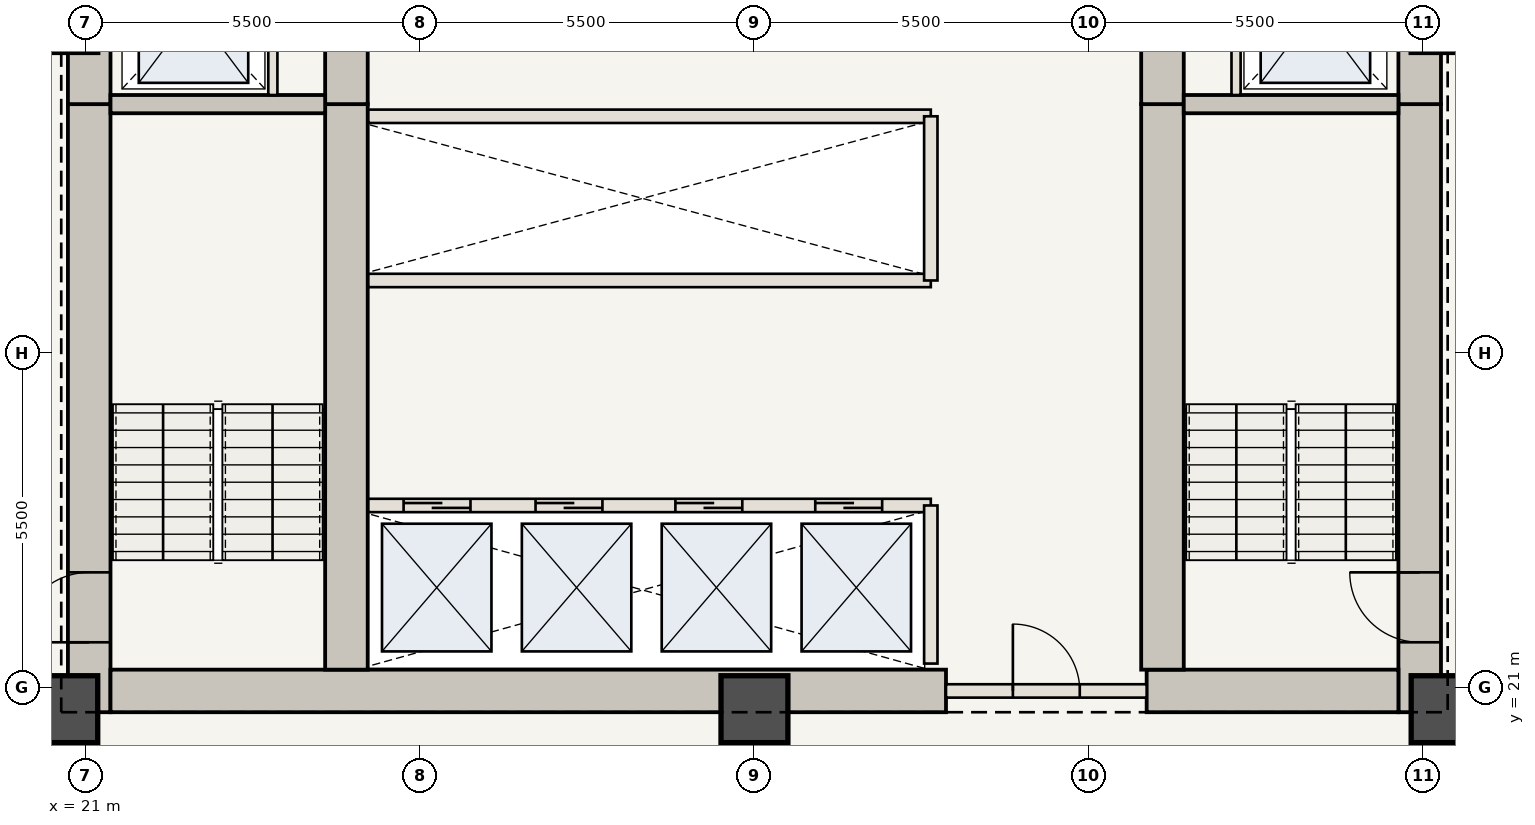
"""IFC4 building model, lengths in metres.
Left out: names, types, materials, properties, quantities, classifications, styles, units other than length and angle.
Written with IfcOpenShell. Run it as: python <this file> out.ifc"""

import sys

from ifc_helpers import new_model, si_unit, direction, frame, frame_2d, origin, origin_2d, place, context, subcontext, project, spatial, rectangle, extrude, element, fill, save


model = new_model("IFC4")
c1 = context("Model", 3, precision=1e-05, world=origin(), true_north=direction((0.0, 1.0)))
c2 = subcontext(c1, "Body", "Model", "MODEL_VIEW")
j1 = project(units=[si_unit("LENGTHUNIT", "METRE"), si_unit("PLANEANGLEUNIT", "RADIAN")], contexts=[c1])
p1 = place(None, origin())
s1 = spatial("IfcSite", under=j1, at=p1, CompositionType="ELEMENT")
p2 = place(p1, origin())
s2 = spatial("IfcBuilding", under=s1, at=p2, CompositionType="ELEMENT")
p3 = place(p2, frame((0.0, 0.0, 42.35)))
s3 = spatial("IfcBuildingStorey", under=s2, at=p3, CompositionType="ELEMENT", Elevation=42.35)
p4 = place(p3, frame((21.06, 20.6, 0.0), z_axis=(0.0, 0.0, 1.0), x_axis=(0.0, 1.0, 0.0)))
e1 = element("IfcWall", 1, at=p4, inside=s3, PredefinedType="SHEAR", context=c2, shape_type="SweptSolid", body=[
    extrude(rectangle(XDim=10.0, YDim=0.7, at=frame_2d((5.0, 0.0))), origin(), (0.0, 0.0, 1.0), 3.5),
])
p5 = place(p4, frame((1.15, 0.0, 0.0)))
e2 = element("IfcOpeningElement", 2, at=p5, cuts=e1, PredefinedType="OPENING", context=c2, shape_type="SweptSolid", body=[
    extrude(rectangle(XDim=1.15, YDim=2.15, at=frame_2d((0.575, 1.075))), frame((0.0, 0.36, 0.0), z_axis=(0.0, -1.0, 0.0), x_axis=(1.0, 0.0, 0.0)), (0.0, 0.0, 1.0), 0.72),
])
p6 = place(p3, frame((21.06, 30.6, 0.0), z_axis=(0.0, 0.0, 1.0), x_axis=(0.0, 1.0, 0.0)))
e3 = element("IfcWall", 3, at=p6, inside=s3, PredefinedType="SHEAR", context=c2, shape_type="SweptSolid", body=[
    extrude(rectangle(XDim=12.75, YDim=0.7, at=frame_2d((6.375, 0.0))), origin(), (0.0, 0.0, 1.0), 3.5),
])
p7 = place(p6, frame((4.2, 0.0, 0.0)))
e4 = element("IfcOpeningElement", 4, at=p7, cuts=e3, PredefinedType="OPENING", context=c2, shape_type="SweptSolid", body=[
    extrude(rectangle(XDim=1.1, YDim=2.15, at=frame_2d((0.55, 1.075))), frame((0.0, 0.36, 0.0), z_axis=(0.0, -1.0, 0.0), x_axis=(1.0, 0.0, 0.0)), (0.0, 0.0, 1.0), 0.72),
])
p8 = place(p6, frame((8.05, 0.0, 0.0)))
e5 = element("IfcOpeningElement", 5, at=p8, cuts=e3, PredefinedType="OPENING", context=c2, shape_type="SweptSolid", body=[
    extrude(rectangle(XDim=0.92, YDim=2.1, at=frame_2d((0.46, 1.05))), frame((0.0, 0.36, 0.0), z_axis=(0.0, -1.0, 0.0), x_axis=(1.0, 0.0, 0.0)), (0.0, 0.0, 1.0), 0.72),
])
p9 = place(p6, frame((9.45, 0.0, 0.0)))
e6 = element("IfcOpeningElement", 6, at=p9, cuts=e3, PredefinedType="OPENING", context=c2, shape_type="SweptSolid", body=[
    extrude(rectangle(XDim=0.88, YDim=2.1, at=frame_2d((0.44, 1.05))), frame((0.0, 0.36, 0.0), z_axis=(0.0, -1.0, 0.0), x_axis=(1.0, 0.0, 0.0)), (0.0, 0.0, 1.0), 0.72),
])
p10 = place(p6, frame((10.85, 0.0, 0.0)))
e7 = element("IfcOpeningElement", 7, at=p10, cuts=e3, PredefinedType="OPENING", context=c2, shape_type="SweptSolid", body=[
    extrude(rectangle(XDim=0.88, YDim=2.1, at=frame_2d((0.44, 1.05))), frame((0.0, 0.36, 0.0), z_axis=(0.0, -1.0, 0.0), x_axis=(1.0, 0.0, 0.0)), (0.0, 0.0, 1.0), 0.72),
])
p11 = place(p3, frame((42.94, 20.6, 0.0), z_axis=(0.0, 0.0, 1.0), x_axis=(0.0, 1.0, 0.0)))
e8 = element("IfcWall", 8, at=p11, inside=s3, PredefinedType="SHEAR", context=c2, shape_type="SweptSolid", body=[
    extrude(rectangle(XDim=10.0, YDim=0.7, at=frame_2d((5.0, 0.0))), origin(), (0.0, 0.0, 1.0), 3.5),
])
p12 = place(p11, frame((1.15, 0.0, 0.0)))
e9 = element("IfcOpeningElement", 9, at=p12, cuts=e8, PredefinedType="OPENING", context=c2, shape_type="SweptSolid", body=[
    extrude(rectangle(XDim=1.15, YDim=2.15, at=frame_2d((0.575, 1.075))), frame((0.0, 0.36, 0.0), z_axis=(0.0, -1.0, 0.0), x_axis=(1.0, 0.0, 0.0)), (0.0, 0.0, 1.0), 0.72),
])
p13 = place(p3, frame((42.94, 30.6, 0.0), z_axis=(0.0, 0.0, 1.0), x_axis=(0.0, 1.0, 0.0)))
e10 = element("IfcWall", 10, at=p13, inside=s3, PredefinedType="SHEAR", context=c2, shape_type="SweptSolid", body=[
    extrude(rectangle(XDim=12.75, YDim=0.7, at=frame_2d((6.375, 0.0))), origin(), (0.0, 0.0, 1.0), 3.5),
])
p14 = place(p13, frame((4.2, 0.0, 0.0)))
e11 = element("IfcOpeningElement", 11, at=p14, cuts=e10, PredefinedType="OPENING", context=c2, shape_type="SweptSolid", body=[
    extrude(rectangle(XDim=1.1, YDim=2.15, at=frame_2d((0.55, 1.075))), frame((0.0, 0.36, 0.0), z_axis=(0.0, -1.0, 0.0), x_axis=(1.0, 0.0, 0.0)), (0.0, 0.0, 1.0), 0.72),
])
p15 = place(p13, frame((9.2, 0.0, 0.0)))
e12 = element("IfcOpeningElement", 12, at=p15, cuts=e10, PredefinedType="OPENING", context=c2, shape_type="SweptSolid", body=[
    extrude(rectangle(XDim=0.92, YDim=2.1, at=frame_2d((0.46, 1.05))), frame((0.0, 0.36, 0.0), z_axis=(0.0, -1.0, 0.0), x_axis=(1.0, 0.0, 0.0)), (0.0, 0.0, 1.0), 0.72),
])
p16 = place(p3, frame((21.41, 20.95, 0.0), z_axis=(0.0, 0.0, 1.0), x_axis=(1.0, 0.0, 0.0)))
e13 = element("IfcWall", 13, at=p16, inside=s3, PredefinedType="SHEAR", context=c2, shape_type="SweptSolid", body=[
    extrude(rectangle(XDim=13.74, YDim=0.7, at=frame_2d((6.87, 0.0))), origin(), (0.0, 0.0, 1.0), 3.5),
])
p17 = place(p3, frame((38.45, 20.95, 0.0), z_axis=(0.0, 0.0, 1.0), x_axis=(1.0, 0.0, 0.0)))
e14 = element("IfcWall", 14, at=p17, inside=s3, PredefinedType="SHEAR", context=c2, shape_type="SweptSolid", body=[
    extrude(rectangle(XDim=4.14, YDim=0.7, at=frame_2d((2.07, 0.0))), origin(), (0.0, 0.0, 1.0), 3.5),
])
p18 = place(p3, frame((25.29, 21.3, 0.0), z_axis=(0.0, 0.0, 1.0), x_axis=(0.0, 1.0, 0.0)))
e15 = element("IfcWall", 15, at=p18, inside=s3, PredefinedType="SHEAR", context=c2, shape_type="SweptSolid", body=[
    extrude(rectangle(XDim=9.3, YDim=0.7, at=frame_2d((4.65, 0.0))), origin(), (0.0, 0.0, 1.0), 3.5),
])
p19 = place(p3, frame((25.29, 30.6, 0.0), z_axis=(0.0, 0.0, 1.0), x_axis=(0.0, 1.0, 0.0)))
e16 = element("IfcWall", 16, at=p19, inside=s3, PredefinedType="SHEAR", context=c2, shape_type="SweptSolid", body=[
    extrude(rectangle(XDim=12.05, YDim=0.7, at=frame_2d((6.025, 0.0))), origin(), (0.0, 0.0, 1.0), 3.5),
])
p20 = place(p19, frame((6.25, 0.0, 0.0)))
e17 = element("IfcOpeningElement", 17, at=p20, cuts=e16, PredefinedType="OPENING", context=c2, shape_type="SweptSolid", body=[
    extrude(rectangle(XDim=1.1, YDim=2.15, at=frame_2d((0.55, 1.075))), frame((0.0, 0.36, 0.0), z_axis=(0.0, -1.0, 0.0), x_axis=(1.0, 0.0, 0.0)), (0.0, 0.0, 1.0), 0.72),
])
p21 = place(p3, frame((38.71, 21.3, 0.0), z_axis=(0.0, 0.0, 1.0), x_axis=(0.0, 1.0, 0.0)))
e18 = element("IfcWall", 18, at=p21, inside=s3, PredefinedType="SHEAR", context=c2, shape_type="SweptSolid", body=[
    extrude(rectangle(XDim=9.3, YDim=0.7, at=frame_2d((4.65, 0.0))), origin(), (0.0, 0.0, 1.0), 3.5),
])
p22 = place(p3, frame((38.71, 30.6, 0.0), z_axis=(0.0, 0.0, 1.0), x_axis=(0.0, 1.0, 0.0)))
e19 = element("IfcWall", 19, at=p22, inside=s3, PredefinedType="SHEAR", context=c2, shape_type="SweptSolid", body=[
    extrude(rectangle(XDim=12.05, YDim=0.7, at=frame_2d((6.025, 0.0))), origin(), (0.0, 0.0, 1.0), 3.5),
])
for number, where, z_axis, x_axis in (
    (20, (20.65, 20.65, 0.0), (0.0, 0.0, 1.0), (1.0, 0.0, 0.0)),
    (21, (32.0, 20.65, 0.0), (0.0, 0.0, 1.0), (1.0, 0.0, 0.0)),
    (22, (43.35, 20.65, 0.0), (0.0, 0.0, 1.0), (1.0, 0.0, 0.0)),
):
    element("IfcColumn", number, at=place(p3, frame(where, z_axis=z_axis, x_axis=x_axis)), inside=s3, PredefinedType="COLUMN", context=c2, shape_type="SweptSolid", body=[
        extrude(rectangle(XDim=1.1, YDim=1.1, at=origin_2d()), origin(), (0.0, 0.0, 1.0), 3.5),
    ])
for number, where, z_axis, x_axis in (
    (23, (21.41, 30.6, 0.0), (0.0, 0.0, 1.0), (1.0, 0.0, 0.0)),
    (24, (39.06, 30.6, 0.0), (0.0, 0.0, 1.0), (1.0, 0.0, 0.0)),
):
    element("IfcWall", number, at=place(p3, frame(where, z_axis=z_axis, x_axis=x_axis)), inside=s3, PredefinedType="SHEAR", context=c2, shape_type="SweptSolid", body=[
        extrude(rectangle(XDim=3.53, YDim=0.3, at=frame_2d((1.765, 0.0))), origin(), (0.0, 0.0, 1.0), 3.32),
    ])
for number, where, z_axis, x_axis in (
    (25, (24.08, 30.75, 0.0), (0.0, 0.0, 1.0), (0.0, 1.0, 0.0)),
    (26, (39.92, 30.75, 0.0), (0.0, 0.0, 1.0), (0.0, 1.0, 0.0)),
):
    element("IfcWall", number, at=place(p3, frame(where, z_axis=z_axis, x_axis=x_axis)), inside=s3, PredefinedType="STANDARD", context=c2, shape_type="SweptSolid", body=[
        extrude(rectangle(XDim=2.65, YDim=0.15, at=frame_2d((1.325, 0.0))), origin(), (0.0, 0.0, 1.0), 3.32),
    ])
p23 = place(p3, frame((35.15, 20.95, 0.0), z_axis=(0.0, 0.0, 1.0), x_axis=(1.0, 0.0, 0.0)))
e27 = element("IfcWall", 27, at=p23, inside=s3, PredefinedType="STANDARD", context=c2, shape_type="SweptSolid", body=[
    extrude(rectangle(XDim=3.3, YDim=0.22, at=frame_2d((1.65, 0.0))), origin(), (0.0, 0.0, 1.0), 3.32),
])
p24 = place(p23, frame((1.1, 0.0, 0.0)))
e28 = element("IfcOpeningElement", 28, at=p24, cuts=e27, PredefinedType="OPENING", context=c2, shape_type="SweptSolid", body=[
    extrude(rectangle(XDim=1.1, YDim=2.15, at=frame_2d((0.55, 1.075))), frame((0.0, 0.12, 0.0), z_axis=(0.0, -1.0, 0.0), x_axis=(1.0, 0.0, 0.0)), (0.0, 0.0, 1.0), 0.24),
])
p25 = place(p3, frame((25.65, 24.0, 0.0), z_axis=(0.0, 0.0, 1.0), x_axis=(1.0, 0.0, 0.0)))
e29 = element("IfcWall", 29, at=p25, inside=s3, PredefinedType="STANDARD", context=c2, shape_type="SweptSolid", body=[
    extrude(rectangle(XDim=9.25, YDim=0.22, at=frame_2d((4.625, 0.0))), origin(), (0.0, 0.0, 1.0), 3.32),
])
p26 = place(p25, frame((0.58, 0.0, 0.0)))
e30 = element("IfcOpeningElement", 30, at=p26, cuts=e29, PredefinedType="OPENING", context=c2, shape_type="SweptSolid", body=[
    extrude(rectangle(XDim=1.1, YDim=2.15, at=frame_2d((0.55, 1.075))), frame((0.0, 0.12, 0.0), z_axis=(0.0, -1.0, 0.0), x_axis=(1.0, 0.0, 0.0)), (0.0, 0.0, 1.0), 0.24),
])
p27 = place(p25, frame((2.75, 0.0, 0.0)))
e31 = element("IfcOpeningElement", 31, at=p27, cuts=e29, PredefinedType="OPENING", context=c2, shape_type="SweptSolid", body=[
    extrude(rectangle(XDim=1.1, YDim=2.15, at=frame_2d((0.55, 1.075))), frame((0.0, 0.12, 0.0), z_axis=(0.0, -1.0, 0.0), x_axis=(1.0, 0.0, 0.0)), (0.0, 0.0, 1.0), 0.24),
])
p28 = place(p25, frame((5.05, 0.0, 0.0)))
e32 = element("IfcOpeningElement", 32, at=p28, cuts=e29, PredefinedType="OPENING", context=c2, shape_type="SweptSolid", body=[
    extrude(rectangle(XDim=1.1, YDim=2.15, at=frame_2d((0.55, 1.075))), frame((0.0, 0.12, 0.0), z_axis=(0.0, -1.0, 0.0), x_axis=(1.0, 0.0, 0.0)), (0.0, 0.0, 1.0), 0.24),
])
p29 = place(p25, frame((7.35, 0.0, 0.0)))
e33 = element("IfcOpeningElement", 33, at=p29, cuts=e29, PredefinedType="OPENING", context=c2, shape_type="SweptSolid", body=[
    extrude(rectangle(XDim=1.1, YDim=2.15, at=frame_2d((0.55, 1.075))), frame((0.0, 0.12, 0.0), z_axis=(0.0, -1.0, 0.0), x_axis=(1.0, 0.0, 0.0)), (0.0, 0.0, 1.0), 0.24),
])
p30 = place(p3, frame((34.9, 21.4, 0.0), z_axis=(0.0, 0.0, 1.0), x_axis=(0.0, 1.0, 0.0)))
e34 = element("IfcWall", 34, at=p30, inside=s3, PredefinedType="STANDARD", context=c2, shape_type="SweptSolid", body=[
    extrude(rectangle(XDim=2.6, YDim=0.22, at=frame_2d((1.3, 0.0))), origin(), (0.0, 0.0, 1.0), 3.32),
])
for number, where, z_axis, x_axis in (
    (35, (25.65, 27.7, 0.0), (0.0, 0.0, 1.0), (1.0, 0.0, 0.0)),
    (36, (25.65, 30.4, 0.0), (0.0, 0.0, 1.0), (1.0, 0.0, 0.0)),
):
    element("IfcWall", number, at=place(p3, frame(where, z_axis=z_axis, x_axis=x_axis)), inside=s3, PredefinedType="STANDARD", context=c2, shape_type="SweptSolid", body=[
        extrude(rectangle(XDim=9.25, YDim=0.22, at=frame_2d((4.625, 0.0))), origin(), (0.0, 0.0, 1.0), 3.32),
    ])
p31 = place(p3, frame((34.9, 27.7, 0.0), z_axis=(0.0, 0.0, 1.0), x_axis=(0.0, 1.0, 0.0)))
e37 = element("IfcWall", 37, at=p31, inside=s3, PredefinedType="STANDARD", context=c2, shape_type="SweptSolid", body=[
    extrude(rectangle(XDim=2.7, YDim=0.22, at=frame_2d((1.35, 0.0))), origin(), (0.0, 0.0, 1.0), 3.32),
])
p32 = place(p5, origin())
e38 = element("IfcDoor", 38, at=p32, inside=s3, OperationType="SINGLE_SWING_LEFT", PredefinedType="DOOR", context=c2, shape_type="SweptSolid", body=[
    extrude(rectangle(XDim=1.15, YDim=2.15, at=frame_2d((0.575, 1.075))), frame((0.0, 0.025, 0.0), z_axis=(0.0, -1.0, 0.0), x_axis=(1.0, 0.0, 0.0)), (0.0, 0.0, 1.0), 0.05),
])
fill(e2, e38)
p33 = place(p12, origin())
e39 = element("IfcDoor", 39, at=p33, inside=s3, OperationType="SINGLE_SWING_RIGHT", PredefinedType="DOOR", context=c2, shape_type="SweptSolid", body=[
    extrude(rectangle(XDim=1.15, YDim=2.15, at=frame_2d((0.575, 1.075))), frame((0.0, 0.025, 0.0), z_axis=(0.0, -1.0, 0.0), x_axis=(1.0, 0.0, 0.0)), (0.0, 0.0, 1.0), 0.05),
])
fill(e9, e39)
p34 = place(p24, origin())
e40 = element("IfcDoor", 40, at=p34, inside=s3, OperationType="SINGLE_SWING_LEFT", PredefinedType="DOOR", context=c2, shape_type="SweptSolid", body=[
    extrude(rectangle(XDim=1.1, YDim=2.15, at=frame_2d((0.55, 1.075))), frame((0.0, 0.025, 0.0), z_axis=(0.0, -1.0, 0.0), x_axis=(1.0, 0.0, 0.0)), (0.0, 0.0, 1.0), 0.05),
])
fill(e28, e40)
p35 = place(p26, origin())
e41 = element("IfcDoor", 41, at=p35, inside=s3, OperationType="DOUBLE_DOOR_SLIDING", PredefinedType="DOOR", context=c2, shape_type="SweptSolid", body=[
    extrude(rectangle(XDim=1.1, YDim=2.15, at=frame_2d((0.55, 1.075))), frame((0.0, 0.025, 0.0), z_axis=(0.0, -1.0, 0.0), x_axis=(1.0, 0.0, 0.0)), (0.0, 0.0, 1.0), 0.05),
])
fill(e30, e41)
p36 = place(p27, origin())
e42 = element("IfcDoor", 42, at=p36, inside=s3, OperationType="DOUBLE_DOOR_SLIDING", PredefinedType="DOOR", context=c2, shape_type="SweptSolid", body=[
    extrude(rectangle(XDim=1.1, YDim=2.15, at=frame_2d((0.55, 1.075))), frame((0.0, 0.025, 0.0), z_axis=(0.0, -1.0, 0.0), x_axis=(1.0, 0.0, 0.0)), (0.0, 0.0, 1.0), 0.05),
])
fill(e31, e42)
p37 = place(p28, origin())
e43 = element("IfcDoor", 43, at=p37, inside=s3, OperationType="DOUBLE_DOOR_SLIDING", PredefinedType="DOOR", context=c2, shape_type="SweptSolid", body=[
    extrude(rectangle(XDim=1.1, YDim=2.15, at=frame_2d((0.55, 1.075))), frame((0.0, 0.025, 0.0), z_axis=(0.0, -1.0, 0.0), x_axis=(1.0, 0.0, 0.0)), (0.0, 0.0, 1.0), 0.05),
])
fill(e32, e43)
p38 = place(p29, origin())
e44 = element("IfcDoor", 44, at=p38, inside=s3, OperationType="DOUBLE_DOOR_SLIDING", PredefinedType="DOOR", context=c2, shape_type="SweptSolid", body=[
    extrude(rectangle(XDim=1.1, YDim=2.15, at=frame_2d((0.55, 1.075))), frame((0.0, 0.025, 0.0), z_axis=(0.0, -1.0, 0.0), x_axis=(1.0, 0.0, 0.0)), (0.0, 0.0, 1.0), 0.05),
])
fill(e33, e44)
save(model, sys.argv[1])
